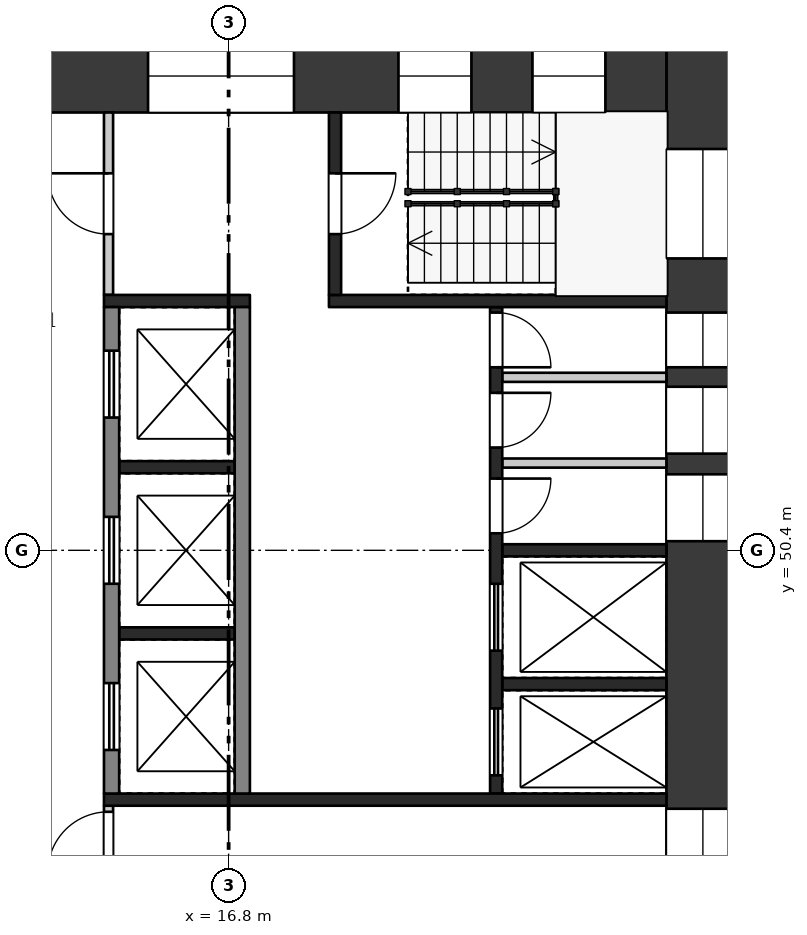
"""IFC4 building model, lengths in metres.
Left out: names, types, materials, properties, quantities, classifications, styles, units other than length and angle.
Written with IfcOpenShell. Run it as: python <this file> out.ifc"""

import sys

from ifc_helpers import new_model, si_unit, direction, frame, frame_2d, origin, place, context, subcontext, project, spatial, rectangle, extrude, element, fill, save


model = new_model("IFC4")
c1 = context("Model", 3, precision=1e-05, world=origin(), true_north=direction((0.0, 1.0)))
c2 = subcontext(c1, "Body", "Model", "MODEL_VIEW")
j1 = project(units=[si_unit("LENGTHUNIT", "METRE"), si_unit("PLANEANGLEUNIT", "RADIAN")], contexts=[c1])
p1 = place(None, origin())
s1 = spatial("IfcSite", under=j1, at=p1, CompositionType="ELEMENT")
p2 = place(p1, origin())
s2 = spatial("IfcBuilding", under=s1, at=p2, CompositionType="ELEMENT")
p3 = place(p2, frame((0.0, 0.0, 266.7)))
s3 = spatial("IfcBuildingStorey", under=s2, at=p3, CompositionType="ELEMENT", Elevation=266.7)
p4 = place(p3, frame((24.6, 58.8, 0.0), z_axis=(0.0, 0.0, 1.0), x_axis=(0.0, -1.0, 0.0)))
e1 = element("IfcWall", 1, at=p4, inside=s3, PredefinedType="SHEAR", context=c2, shape_type="SweptSolid", body=[
    extrude(rectangle(XDim=16.8, YDim=1.2, at=frame_2d((8.4, 0.0))), origin(), (0.0, 0.0, 1.0), 3.22),
])
p5 = place(p4, frame((1.8, 0.0, 0.5)))
e2 = element("IfcOpeningElement", 2, at=p5, cuts=e1, PredefinedType="OPENING", context=c2, shape_type="SweptSolid", body=[
    extrude(rectangle(XDim=1.8, YDim=2.4, at=frame_2d((0.9, 1.2))), frame((0.0, 0.61, 0.0), z_axis=(0.0, -1.0, 0.0), x_axis=(1.0, 0.0, 0.0)), (0.0, 0.0, 1.0), 1.22),
])
p6 = place(p4, frame((4.49, 0.0, 1.6)))
e3 = element("IfcOpeningElement", 3, at=p6, cuts=e1, PredefinedType="OPENING", context=c2, shape_type="SweptSolid", body=[
    extrude(rectangle(XDim=0.9, YDim=1.2, at=frame_2d((0.45, 0.6))), frame((0.0, 0.61, 0.0), z_axis=(0.0, -1.0, 0.0), x_axis=(1.0, 0.0, 0.0)), (0.0, 0.0, 1.0), 1.22),
])
p7 = place(p4, frame((5.71, 0.0, 1.6)))
e4 = element("IfcOpeningElement", 4, at=p7, cuts=e1, PredefinedType="OPENING", context=c2, shape_type="SweptSolid", body=[
    extrude(rectangle(XDim=1.1, YDim=1.2, at=frame_2d((0.55, 0.6))), frame((0.0, 0.61, 0.0), z_axis=(0.0, -1.0, 0.0), x_axis=(1.0, 0.0, 0.0)), (0.0, 0.0, 1.0), 1.22),
])
p8 = place(p4, frame((7.15, 0.0, 1.6)))
e5 = element("IfcOpeningElement", 5, at=p8, cuts=e1, PredefinedType="OPENING", context=c2, shape_type="SweptSolid", body=[
    extrude(rectangle(XDim=1.1, YDim=1.2, at=frame_2d((0.55, 0.6))), frame((0.0, 0.61, 0.0), z_axis=(0.0, -1.0, 0.0), x_axis=(1.0, 0.0, 0.0)), (0.0, 0.0, 1.0), 1.22),
])
p9 = place(p4, frame((12.65, 0.0, 0.6)))
e6 = element("IfcOpeningElement", 6, at=p9, cuts=e1, PredefinedType="OPENING", context=c2, shape_type="SweptSolid", body=[
    extrude(rectangle(XDim=1.0, YDim=2.1, at=frame_2d((0.5, 1.05))), frame((0.0, 0.61, 0.0), z_axis=(0.0, -1.0, 0.0), x_axis=(1.0, 0.0, 0.0)), (0.0, 0.0, 1.0), 1.22),
])
p10 = place(p4, frame((14.175, 0.0, 1.6)))
e7 = element("IfcOpeningElement", 7, at=p10, cuts=e1, PredefinedType="OPENING", context=c2, shape_type="SweptSolid", body=[
    extrude(rectangle(XDim=1.2, YDim=1.2, at=frame_2d((0.6, 0.6))), frame((0.0, 0.61, 0.0), z_axis=(0.0, -1.0, 0.0), x_axis=(1.0, 0.0, 0.0)), (0.0, 0.0, 1.0), 1.22),
])
p11 = place(p3, frame((9.6, 58.2, 0.0), z_axis=(0.0, 0.0, 1.0), x_axis=(1.0, 0.0, 0.0)))
e8 = element("IfcWall", 8, at=p11, inside=s3, PredefinedType="SHEAR", context=c2, shape_type="SweptSolid", body=[
    extrude(rectangle(XDim=14.4, YDim=1.2, at=frame_2d((7.2, 0.0))), origin(), (0.0, 0.0, 1.0), 3.22),
])
p12 = place(p11, frame((1.105, 0.0, 0.6)))
e9 = element("IfcOpeningElement", 9, at=p12, cuts=e8, PredefinedType="OPENING", context=c2, shape_type="SweptSolid", body=[
    extrude(rectangle(XDim=3.0, YDim=2.1, at=frame_2d((1.5, 1.05))), frame((0.0, 0.61, 0.0), z_axis=(0.0, -1.0, 0.0), x_axis=(1.0, 0.0, 0.0)), (0.0, 0.0, 1.0), 1.22),
])
p13 = place(p11, frame((5.875, 0.0, 0.6)))
e10 = element("IfcOpeningElement", 10, at=p13, cuts=e8, PredefinedType="OPENING", context=c2, shape_type="SweptSolid", body=[
    extrude(rectangle(XDim=2.4, YDim=2.1, at=frame_2d((1.2, 1.05))), frame((0.0, 0.61, 0.0), z_axis=(0.0, -1.0, 0.0), x_axis=(1.0, 0.0, 0.0)), (0.0, 0.0, 1.0), 1.22),
])
p14 = place(p11, frame((9.993, 0.0, 0.5)))
e11 = element("IfcOpeningElement", 11, at=p14, cuts=e8, PredefinedType="OPENING", context=c2, shape_type="SweptSolid", body=[
    extrude(rectangle(XDim=1.2, YDim=2.4, at=frame_2d((0.6, 1.2))), frame((0.0, 0.61, 0.0), z_axis=(0.0, -1.0, 0.0), x_axis=(1.0, 0.0, 0.0)), (0.0, 0.0, 1.0), 1.22),
])
p15 = place(p11, frame((12.197, 0.0, 0.5)))
e12 = element("IfcOpeningElement", 12, at=p15, cuts=e8, PredefinedType="OPENING", context=c2, shape_type="SweptSolid", body=[
    extrude(rectangle(XDim=1.2, YDim=2.4, at=frame_2d((0.6, 1.2))), frame((0.0, 0.61, 0.0), z_axis=(0.0, -1.0, 0.0), x_axis=(1.0, 0.0, 0.0)), (0.0, 0.0, 1.0), 1.22),
])
for number, where, z_axis, x_axis in (
    (13, (15.0, 51.767, 0.0), (0.0, 0.0, 1.0), (1.0, 0.0, 0.0)),
    (14, (15.0, 49.033, 0.0), (0.0, 0.0, 1.0), (1.0, 0.0, 0.0)),
):
    element("IfcWall", number, at=place(p3, frame(where, z_axis=z_axis, x_axis=x_axis)), inside=s3, PredefinedType="SHEAR", context=c2, shape_type="SweptSolid", body=[
        extrude(rectangle(XDim=1.9, YDim=0.2, at=frame_2d((0.95, 0.0))), origin(), (0.0, 0.0, 1.0), 3.22),
    ])
p16 = place(p3, frame((14.875, 54.4, 0.0), z_axis=(0.0, 0.0, 1.0), x_axis=(0.0, -1.0, 0.0)))
e15 = element("IfcWall", 15, at=p16, inside=s3, PredefinedType="SHEAR", context=c2, shape_type="SweptSolid", body=[
    extrude(rectangle(XDim=8.0, YDim=0.25, at=frame_2d((4.0, 0.0))), origin(), (0.0, 0.0, 1.0), 3.22),
])
p17 = place(p16, frame((0.717, 0.0, 0.0)))
e16 = element("IfcOpeningElement", 16, at=p17, cuts=e15, PredefinedType="OPENING", context=c2, shape_type="SweptSolid", body=[
    extrude(rectangle(XDim=1.1, YDim=2.1, at=frame_2d((0.55, 1.05))), frame((0.0, 0.135, 0.0), z_axis=(0.0, -1.0, 0.0), x_axis=(1.0, 0.0, 0.0)), (0.0, 0.0, 1.0), 0.27),
])
p18 = place(p16, frame((3.45, 0.0, 0.0)))
e17 = element("IfcOpeningElement", 17, at=p18, cuts=e15, PredefinedType="OPENING", context=c2, shape_type="SweptSolid", body=[
    extrude(rectangle(XDim=1.1, YDim=2.1, at=frame_2d((0.55, 1.05))), frame((0.0, 0.135, 0.0), z_axis=(0.0, -1.0, 0.0), x_axis=(1.0, 0.0, 0.0)), (0.0, 0.0, 1.0), 0.27),
])
p19 = place(p16, frame((6.183, 0.0, 0.0)))
e18 = element("IfcOpeningElement", 18, at=p19, cuts=e15, PredefinedType="OPENING", context=c2, shape_type="SweptSolid", body=[
    extrude(rectangle(XDim=1.1, YDim=2.1, at=frame_2d((0.55, 1.05))), frame((0.0, 0.135, 0.0), z_axis=(0.0, -1.0, 0.0), x_axis=(1.0, 0.0, 0.0)), (0.0, 0.0, 1.0), 0.27),
])
p20 = place(p3, frame((17.025, 54.4, 0.0), z_axis=(0.0, 0.0, 1.0), x_axis=(0.0, -1.0, 0.0)))
e19 = element("IfcWall", 19, at=p20, inside=s3, PredefinedType="SHEAR", context=c2, shape_type="SweptSolid", body=[
    extrude(rectangle(XDim=8.0, YDim=0.25, at=frame_2d((4.0, 0.0))), origin(), (0.0, 0.0, 1.0), 3.22),
])
for number, where, z_axis, x_axis in (
    (20, (21.3, 50.4, 0.0), (0.0, 0.0, 1.0), (1.0, 0.0, 0.0)),
    (21, (21.3, 48.2, 0.0), (0.0, 0.0, 1.0), (1.0, 0.0, 0.0)),
):
    element("IfcWall", number, at=place(p3, frame(where, z_axis=z_axis, x_axis=x_axis)), inside=s3, PredefinedType="SHEAR", context=c2, shape_type="SweptSolid", body=[
        extrude(rectangle(XDim=2.7, YDim=0.2, at=frame_2d((1.35, 0.0))), origin(), (0.0, 0.0, 1.0), 3.22),
    ])
for number, where, z_axis, x_axis in (
    (22, (21.3, 53.245, 0.0), (0.0, 0.0, 1.0), (1.0, 0.0, 0.0)),
    (23, (21.3, 51.835, 0.0), (0.0, 0.0, 1.0), (1.0, 0.0, 0.0)),
):
    element("IfcWall", number, at=place(p3, frame(where, z_axis=z_axis, x_axis=x_axis)), inside=s3, PredefinedType="PARTITIONING", context=c2, shape_type="SweptSolid", body=[
        extrude(rectangle(XDim=2.7, YDim=0.15, at=frame_2d((1.35, 0.0))), origin(), (0.0, 0.0, 1.0), 3.22),
    ])
p21 = place(p3, frame((21.2, 54.4, 0.0), z_axis=(0.0, 0.0, 1.0), x_axis=(0.0, -1.0, 0.0)))
e24 = element("IfcWall", 24, at=p21, inside=s3, PredefinedType="SHEAR", context=c2, shape_type="SweptSolid", body=[
    extrude(rectangle(XDim=8.0, YDim=0.2, at=frame_2d((4.0, 0.0))), origin(), (0.0, 0.0, 1.0), 3.22),
])
p22 = place(p21, frame((0.09, 0.0, 0.0)))
e25 = element("IfcOpeningElement", 25, at=p22, cuts=e24, PredefinedType="OPENING", context=c2, shape_type="SweptSolid", body=[
    extrude(rectangle(XDim=0.9, YDim=2.1, at=frame_2d((0.45, 1.05))), frame((0.0, 0.11, 0.0), z_axis=(0.0, -1.0, 0.0), x_axis=(1.0, 0.0, 0.0)), (0.0, 0.0, 1.0), 0.22),
])
p23 = place(p21, frame((1.41, 0.0, 0.0)))
e26 = element("IfcOpeningElement", 26, at=p23, cuts=e24, PredefinedType="OPENING", context=c2, shape_type="SweptSolid", body=[
    extrude(rectangle(XDim=0.9, YDim=2.1, at=frame_2d((0.45, 1.05))), frame((0.0, 0.11, 0.0), z_axis=(0.0, -1.0, 0.0), x_axis=(1.0, 0.0, 0.0)), (0.0, 0.0, 1.0), 0.22),
])
p24 = place(p21, frame((2.82, 0.0, 0.0)))
e27 = element("IfcOpeningElement", 27, at=p24, cuts=e24, PredefinedType="OPENING", context=c2, shape_type="SweptSolid", body=[
    extrude(rectangle(XDim=0.9, YDim=2.1, at=frame_2d((0.45, 1.05))), frame((0.0, 0.11, 0.0), z_axis=(0.0, -1.0, 0.0), x_axis=(1.0, 0.0, 0.0)), (0.0, 0.0, 1.0), 0.22),
])
p25 = place(p21, frame((4.55, 0.0, 0.0)))
e28 = element("IfcOpeningElement", 28, at=p25, cuts=e24, PredefinedType="OPENING", context=c2, shape_type="SweptSolid", body=[
    extrude(rectangle(XDim=1.1, YDim=2.1, at=frame_2d((0.55, 1.05))), frame((0.0, 0.11, 0.0), z_axis=(0.0, -1.0, 0.0), x_axis=(1.0, 0.0, 0.0)), (0.0, 0.0, 1.0), 0.22),
])
p26 = place(p21, frame((6.6, 0.0, 0.0)))
e29 = element("IfcOpeningElement", 29, at=p26, cuts=e24, PredefinedType="OPENING", context=c2, shape_type="SweptSolid", body=[
    extrude(rectangle(XDim=1.1, YDim=2.1, at=frame_2d((0.55, 1.05))), frame((0.0, 0.11, 0.0), z_axis=(0.0, -1.0, 0.0), x_axis=(1.0, 0.0, 0.0)), (0.0, 0.0, 1.0), 0.22),
])
p27 = place(p3, frame((14.75, 54.5, 0.0), z_axis=(0.0, 0.0, 1.0), x_axis=(1.0, 0.0, 0.0)))
e30 = element("IfcWall", 30, at=p27, inside=s3, PredefinedType="SHEAR", context=c2, shape_type="SweptSolid", body=[
    extrude(rectangle(XDim=2.4, YDim=0.2, at=frame_2d((1.2, 0.0))), origin(), (0.0, 0.0, 1.0), 3.22),
])
p28 = place(p3, frame((18.45, 54.5, 0.0), z_axis=(0.0, 0.0, 1.0), x_axis=(1.0, 0.0, 0.0)))
e31 = element("IfcWall", 31, at=p28, inside=s3, PredefinedType="SHEAR", context=c2, shape_type="SweptSolid", body=[
    extrude(rectangle(XDim=5.55, YDim=0.2, at=frame_2d((2.775, 0.0))), origin(), (0.0, 0.0, 1.0), 3.22),
])
p29 = place(p3, frame((14.825, 57.6, 0.0), z_axis=(0.0, 0.0, 1.0), x_axis=(0.0, -1.0, 0.0)))
e32 = element("IfcWall", 32, at=p29, inside=s3, PredefinedType="PARTITIONING", context=c2, shape_type="SweptSolid", body=[
    extrude(rectangle(XDim=3.0, YDim=0.15, at=frame_2d((1.5, 0.0))), origin(), (0.0, 0.0, 1.0), 3.22),
])
p30 = place(p29, frame((1.0, 0.0, 0.0)))
e33 = element("IfcOpeningElement", 33, at=p30, cuts=e32, PredefinedType="OPENING", context=c2, shape_type="SweptSolid", body=[
    extrude(rectangle(XDim=1.0, YDim=2.1, at=frame_2d((0.5, 1.05))), frame((0.0, 0.085, 0.0), z_axis=(0.0, -1.0, 0.0), x_axis=(1.0, 0.0, 0.0)), (0.0, 0.0, 1.0), 0.17),
])
p31 = place(p3, frame((18.55, 57.6, 0.0), z_axis=(0.0, 0.0, 1.0), x_axis=(0.0, -1.0, 0.0)))
e34 = element("IfcWall", 34, at=p31, inside=s3, PredefinedType="SHEAR", context=c2, shape_type="SweptSolid", body=[
    extrude(rectangle(XDim=3.0, YDim=0.2, at=frame_2d((1.5, 0.0))), origin(), (0.0, 0.0, 1.0), 3.22),
])
p32 = place(p31, frame((1.0, 0.0, 0.0)))
e35 = element("IfcOpeningElement", 35, at=p32, cuts=e34, PredefinedType="OPENING", context=c2, shape_type="SweptSolid", body=[
    extrude(rectangle(XDim=1.0, YDim=2.1, at=frame_2d((0.5, 1.05))), frame((0.0, 0.11, 0.0), z_axis=(0.0, -1.0, 0.0), x_axis=(1.0, 0.0, 0.0)), (0.0, 0.0, 1.0), 0.22),
])
p33 = place(p3, frame((14.75, 46.3, 0.0), z_axis=(0.0, 0.0, 1.0), x_axis=(1.0, 0.0, 0.0)))
e36 = element("IfcWall", 36, at=p33, inside=s3, PredefinedType="SHEAR", context=c2, shape_type="SweptSolid", body=[
    extrude(rectangle(XDim=9.25, YDim=0.2, at=frame_2d((4.625, 0.0))), origin(), (0.0, 0.0, 1.0), 3.22),
])
p34 = place(p3, frame((14.825, 46.2, 0.0), z_axis=(0.0, 0.0, 1.0), x_axis=(0.0, -1.0, 0.0)))
e37 = element("IfcWall", 37, at=p34, inside=s3, PredefinedType="PARTITIONING", context=c2, shape_type="SweptSolid", body=[
    extrude(rectangle(XDim=3.0, YDim=0.15, at=frame_2d((1.5, 0.0))), origin(), (0.0, 0.0, 1.0), 3.22),
])
p35 = place(p34, frame((0.1, 0.0, 0.0)))
e38 = element("IfcOpeningElement", 38, at=p35, cuts=e37, PredefinedType="OPENING", context=c2, shape_type="SweptSolid", body=[
    extrude(rectangle(XDim=1.0, YDim=2.1, at=frame_2d((0.5, 1.05))), frame((0.0, 0.085, 0.0), z_axis=(0.0, -1.0, 0.0), x_axis=(1.0, 0.0, 0.0)), (0.0, 0.0, 1.0), 0.17),
])
p36 = place(p17, origin())
e39 = element("IfcDoor", 39, at=p36, inside=s3, OperationType="DOUBLE_DOOR_SLIDING", PredefinedType="DOOR", context=c2, shape_type="SweptSolid", body=[
    extrude(rectangle(XDim=1.1, YDim=2.1, at=frame_2d((0.55, 1.05))), frame((0.0, 0.025, 0.0), z_axis=(0.0, -1.0, 0.0), x_axis=(1.0, 0.0, 0.0)), (0.0, 0.0, 1.0), 0.05),
])
fill(e16, e39)
p37 = place(p18, origin())
e40 = element("IfcDoor", 40, at=p37, inside=s3, OperationType="DOUBLE_DOOR_SLIDING", PredefinedType="DOOR", context=c2, shape_type="SweptSolid", body=[
    extrude(rectangle(XDim=1.1, YDim=2.1, at=frame_2d((0.55, 1.05))), frame((0.0, 0.025, 0.0), z_axis=(0.0, -1.0, 0.0), x_axis=(1.0, 0.0, 0.0)), (0.0, 0.0, 1.0), 0.05),
])
fill(e17, e40)
p38 = place(p19, origin())
e41 = element("IfcDoor", 41, at=p38, inside=s3, OperationType="DOUBLE_DOOR_SLIDING", PredefinedType="DOOR", context=c2, shape_type="SweptSolid", body=[
    extrude(rectangle(XDim=1.1, YDim=2.1, at=frame_2d((0.55, 1.05))), frame((0.0, 0.025, 0.0), z_axis=(0.0, -1.0, 0.0), x_axis=(1.0, 0.0, 0.0)), (0.0, 0.0, 1.0), 0.05),
])
fill(e18, e41)
p39 = place(p22, origin())
e42 = element("IfcDoor", 42, at=p39, inside=s3, OperationType="SINGLE_SWING_RIGHT", PredefinedType="DOOR", context=c2, shape_type="SweptSolid", body=[
    extrude(rectangle(XDim=0.9, YDim=2.1, at=frame_2d((0.45, 1.05))), frame((0.0, 0.025, 0.0), z_axis=(0.0, -1.0, 0.0), x_axis=(1.0, 0.0, 0.0)), (0.0, 0.0, 1.0), 0.05),
])
fill(e25, e42)
p40 = place(p23, origin())
e43 = element("IfcDoor", 43, at=p40, inside=s3, OperationType="SINGLE_SWING_LEFT", PredefinedType="DOOR", context=c2, shape_type="SweptSolid", body=[
    extrude(rectangle(XDim=0.9, YDim=2.1, at=frame_2d((0.45, 1.05))), frame((0.0, 0.025, 0.0), z_axis=(0.0, -1.0, 0.0), x_axis=(1.0, 0.0, 0.0)), (0.0, 0.0, 1.0), 0.05),
])
fill(e26, e43)
p41 = place(p24, origin())
e44 = element("IfcDoor", 44, at=p41, inside=s3, OperationType="SINGLE_SWING_LEFT", PredefinedType="DOOR", context=c2, shape_type="SweptSolid", body=[
    extrude(rectangle(XDim=0.9, YDim=2.1, at=frame_2d((0.45, 1.05))), frame((0.0, 0.025, 0.0), z_axis=(0.0, -1.0, 0.0), x_axis=(1.0, 0.0, 0.0)), (0.0, 0.0, 1.0), 0.05),
])
fill(e27, e44)
p42 = place(p25, origin())
e45 = element("IfcDoor", 45, at=p42, inside=s3, OperationType="DOUBLE_DOOR_SLIDING", PredefinedType="DOOR", context=c2, shape_type="SweptSolid", body=[
    extrude(rectangle(XDim=1.1, YDim=2.1, at=frame_2d((0.55, 1.05))), frame((0.0, 0.025, 0.0), z_axis=(0.0, -1.0, 0.0), x_axis=(1.0, 0.0, 0.0)), (0.0, 0.0, 1.0), 0.05),
])
fill(e28, e45)
p43 = place(p26, origin())
e46 = element("IfcDoor", 46, at=p43, inside=s3, OperationType="DOUBLE_DOOR_SLIDING", PredefinedType="DOOR", context=c2, shape_type="SweptSolid", body=[
    extrude(rectangle(XDim=1.1, YDim=2.1, at=frame_2d((0.55, 1.05))), frame((0.0, 0.025, 0.0), z_axis=(0.0, -1.0, 0.0), x_axis=(1.0, 0.0, 0.0)), (0.0, 0.0, 1.0), 0.05),
])
fill(e29, e46)
p44 = place(p30, frame((1.0, 0.0, 0.0), z_axis=(0.0, 0.0, 1.0), x_axis=(-1.0, 0.0, 0.0)))
e47 = element("IfcDoor", 47, at=p44, inside=s3, OperationType="SINGLE_SWING_RIGHT", PredefinedType="DOOR", context=c2, shape_type="SweptSolid", body=[
    extrude(rectangle(XDim=1.0, YDim=2.1, at=frame_2d((0.5, 1.05))), frame((0.0, 0.025, 0.0), z_axis=(0.0, -1.0, 0.0), x_axis=(1.0, 0.0, 0.0)), (0.0, 0.0, 1.0), 0.05),
])
fill(e33, e47)
p45 = place(p32, origin())
e48 = element("IfcDoor", 48, at=p45, inside=s3, OperationType="SINGLE_SWING_LEFT", PredefinedType="DOOR", context=c2, shape_type="SweptSolid", body=[
    extrude(rectangle(XDim=1.0, YDim=2.1, at=frame_2d((0.5, 1.05))), frame((0.0, 0.025, 0.0), z_axis=(0.0, -1.0, 0.0), x_axis=(1.0, 0.0, 0.0)), (0.0, 0.0, 1.0), 0.05),
])
fill(e35, e48)
p46 = place(p35, frame((1.0, 0.0, 0.0), z_axis=(0.0, 0.0, 1.0), x_axis=(-1.0, 0.0, 0.0)))
e49 = element("IfcDoor", 49, at=p46, inside=s3, OperationType="SINGLE_SWING_LEFT", PredefinedType="DOOR", context=c2, shape_type="SweptSolid", body=[
    extrude(rectangle(XDim=1.0, YDim=2.1, at=frame_2d((0.5, 1.05))), frame((0.0, 0.025, 0.0), z_axis=(0.0, -1.0, 0.0), x_axis=(1.0, 0.0, 0.0)), (0.0, 0.0, 1.0), 0.05),
])
fill(e38, e49)
p47 = place(p5, origin())
e50 = element("IfcWindow", 50, at=p47, inside=s3, PartitioningType="SINGLE_PANEL", PredefinedType="WINDOW", context=c2, shape_type="SweptSolid", body=[
    extrude(rectangle(XDim=1.8, YDim=2.4, at=frame_2d((0.9, 1.2))), frame((0.0, 0.03, 0.0), z_axis=(0.0, -1.0, 0.0), x_axis=(1.0, 0.0, 0.0)), (0.0, 0.0, 1.0), 0.06),
])
fill(e2, e50)
p48 = place(p6, origin())
e51 = element("IfcWindow", 51, at=p48, inside=s3, PartitioningType="SINGLE_PANEL", PredefinedType="WINDOW", context=c2, shape_type="SweptSolid", body=[
    extrude(rectangle(XDim=0.9, YDim=1.2, at=frame_2d((0.45, 0.6))), frame((0.0, 0.03, 0.0), z_axis=(0.0, -1.0, 0.0), x_axis=(1.0, 0.0, 0.0)), (0.0, 0.0, 1.0), 0.06),
])
fill(e3, e51)
p49 = place(p7, origin())
e52 = element("IfcWindow", 52, at=p49, inside=s3, PartitioningType="SINGLE_PANEL", PredefinedType="WINDOW", context=c2, shape_type="SweptSolid", body=[
    extrude(rectangle(XDim=1.1, YDim=1.2, at=frame_2d((0.55, 0.6))), frame((0.0, 0.03, 0.0), z_axis=(0.0, -1.0, 0.0), x_axis=(1.0, 0.0, 0.0)), (0.0, 0.0, 1.0), 0.06),
])
fill(e4, e52)
p50 = place(p8, origin())
e53 = element("IfcWindow", 53, at=p50, inside=s3, PartitioningType="SINGLE_PANEL", PredefinedType="WINDOW", context=c2, shape_type="SweptSolid", body=[
    extrude(rectangle(XDim=1.1, YDim=1.2, at=frame_2d((0.55, 0.6))), frame((0.0, 0.03, 0.0), z_axis=(0.0, -1.0, 0.0), x_axis=(1.0, 0.0, 0.0)), (0.0, 0.0, 1.0), 0.06),
])
fill(e5, e53)
p51 = place(p9, origin())
e54 = element("IfcWindow", 54, at=p51, inside=s3, PartitioningType="SINGLE_PANEL", PredefinedType="WINDOW", context=c2, shape_type="SweptSolid", body=[
    extrude(rectangle(XDim=1.0, YDim=2.1, at=frame_2d((0.5, 1.05))), frame((0.0, 0.03, 0.0), z_axis=(0.0, -1.0, 0.0), x_axis=(1.0, 0.0, 0.0)), (0.0, 0.0, 1.0), 0.06),
])
fill(e6, e54)
p52 = place(p13, origin())
e55 = element("IfcWindow", 55, at=p52, inside=s3, PartitioningType="SINGLE_PANEL", PredefinedType="WINDOW", context=c2, shape_type="SweptSolid", body=[
    extrude(rectangle(XDim=2.4, YDim=2.1, at=frame_2d((1.2, 1.05))), frame((0.0, 0.03, 0.0), z_axis=(0.0, -1.0, 0.0), x_axis=(1.0, 0.0, 0.0)), (0.0, 0.0, 1.0), 0.06),
])
fill(e10, e55)
p53 = place(p14, origin())
e56 = element("IfcWindow", 56, at=p53, inside=s3, PartitioningType="SINGLE_PANEL", PredefinedType="WINDOW", context=c2, shape_type="SweptSolid", body=[
    extrude(rectangle(XDim=1.2, YDim=2.4, at=frame_2d((0.6, 1.2))), frame((0.0, 0.03, 0.0), z_axis=(0.0, -1.0, 0.0), x_axis=(1.0, 0.0, 0.0)), (0.0, 0.0, 1.0), 0.06),
])
fill(e11, e56)
p54 = place(p15, origin())
e57 = element("IfcWindow", 57, at=p54, inside=s3, PartitioningType="SINGLE_PANEL", PredefinedType="WINDOW", context=c2, shape_type="SweptSolid", body=[
    extrude(rectangle(XDim=1.2, YDim=2.4, at=frame_2d((0.6, 1.2))), frame((0.0, 0.03, 0.0), z_axis=(0.0, -1.0, 0.0), x_axis=(1.0, 0.0, 0.0)), (0.0, 0.0, 1.0), 0.06),
])
fill(e12, e57)
save(model, sys.argv[1])
